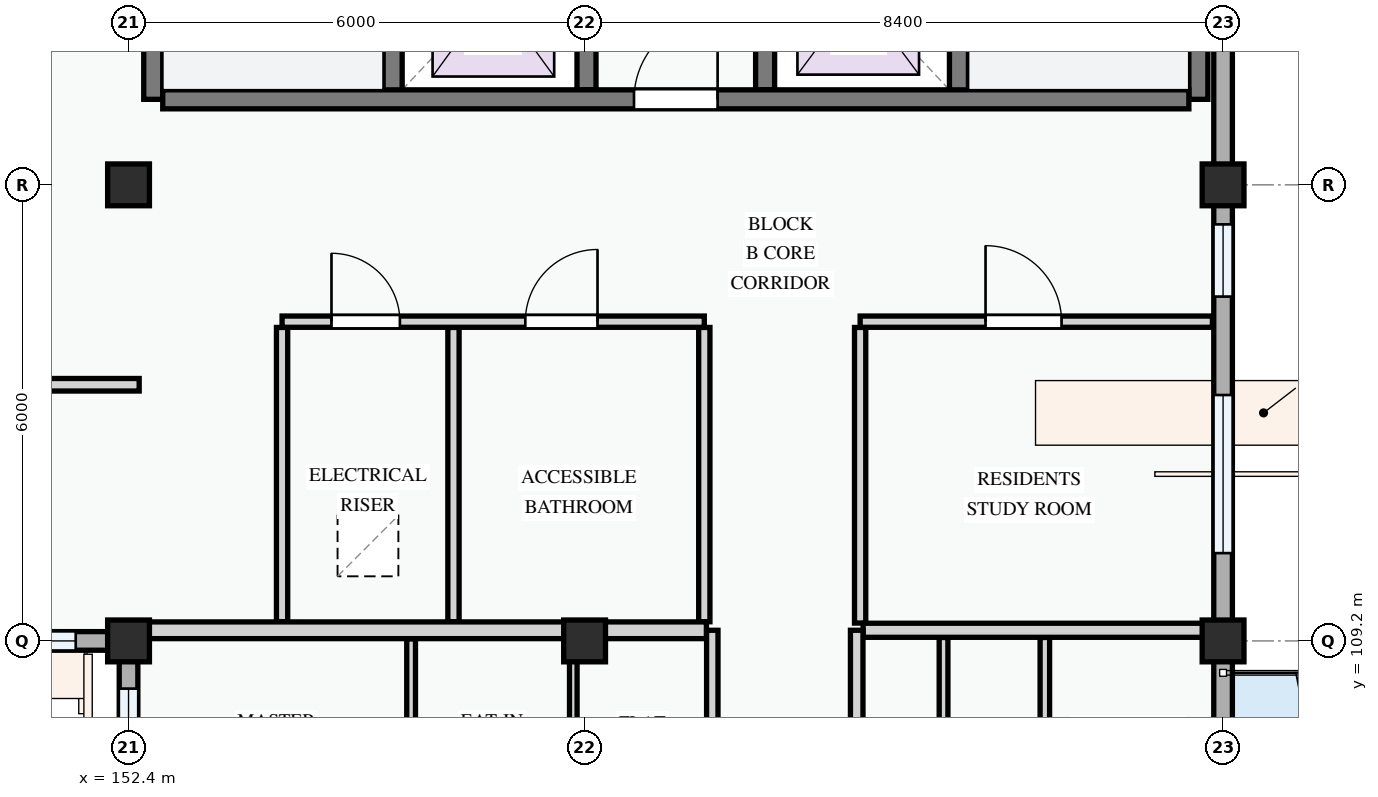
"""IFC4 building model, lengths in metres.
Left out: names, types, materials, properties, quantities, classifications, styles, units other than length and angle.
Written with IfcOpenShell. Run it as: python <this file> out.ifc"""

import sys

from ifc_helpers import new_model, si_unit, direction, frame, frame_2d, origin, origin_2d, place, context, subcontext, project, spatial, rectangle, extrude, element, fill, save


model = new_model("IFC4")
c1 = context("Model", 3, precision=1e-05, world=origin(), true_north=direction((0.0, 1.0)))
c2 = subcontext(c1, "Body", "Model", "MODEL_VIEW")
j1 = project(units=[si_unit("LENGTHUNIT", "METRE"), si_unit("PLANEANGLEUNIT", "RADIAN")], contexts=[c1])
p1 = place(None, origin())
s1 = spatial("IfcSite", under=j1, at=p1, CompositionType="ELEMENT")
p2 = place(p1, origin())
s2 = spatial("IfcBuilding", under=s1, at=p2, CompositionType="ELEMENT")
p3 = place(p2, frame((0.0, 0.0, 37.8)))
s3 = spatial("IfcBuildingStorey", under=s2, at=p3, CompositionType="ELEMENT", Elevation=37.8)
for number, where, z_axis, x_axis in (
    (1, (152.4, 109.2, 0.0), (0.0, 0.0, 1.0), (1.0, 0.0, 0.0)),
    (2, (152.4, 115.2, 0.0), (0.0, 0.0, 1.0), (1.0, 0.0, 0.0)),
    (3, (158.4, 109.2, 0.0), (0.0, 0.0, 1.0), (1.0, 0.0, 0.0)),
    (4, (166.8, 109.2, 0.0), (0.0, 0.0, 1.0), (1.0, 0.0, 0.0)),
    (5, (166.8, 115.2, 0.0), (0.0, 0.0, 1.0), (1.0, 0.0, 0.0)),
):
    element("IfcColumn", number, at=place(p3, frame(where, z_axis=z_axis, x_axis=x_axis)), inside=s3, PredefinedType="COLUMN", context=c2, shape_type="SweptSolid", body=[
        extrude(rectangle(XDim=0.55, YDim=0.55, at=origin_2d()), origin(), (0.0, 0.0, 1.0), 3.3),
    ])
p4 = place(p3, frame((166.8, 109.2, 0.0), z_axis=(0.0, 0.0, 1.0), x_axis=(0.0, 1.0, 0.0)))
e6 = element("IfcWall", 6, at=p4, inside=s3, PredefinedType="STANDARD", context=c2, shape_type="SweptSolid", body=[
    extrude(rectangle(XDim=6.0, YDim=0.245, at=frame_2d((3.0, 0.0))), origin(), (0.0, 0.0, 1.0), 2.575),
])
p5 = place(p4, frame((1.155, 0.0, 0.78)))
e7 = element("IfcOpeningElement", 7, at=p5, cuts=e6, PredefinedType="OPENING", context=c2, shape_type="SweptSolid", body=[
    extrude(rectangle(XDim=2.08, YDim=1.52, at=frame_2d((1.04, 0.76))), frame((0.0, 0.133, 0.0), z_axis=(0.0, -1.0, 0.0), x_axis=(1.0, 0.0, 0.0)), (0.0, 0.0, 1.0), 0.265),
])
p6 = place(p4, frame((4.53, 0.0, 0.78)))
e8 = element("IfcOpeningElement", 8, at=p6, cuts=e6, PredefinedType="OPENING", context=c2, shape_type="SweptSolid", body=[
    extrude(rectangle(XDim=0.95, YDim=1.15, at=frame_2d((0.475, 0.575))), frame((0.0, 0.133, 0.0), z_axis=(0.0, -1.0, 0.0), x_axis=(1.0, 0.0, 0.0)), (0.0, 0.0, 1.0), 0.265),
])
p7 = place(p3, frame((166.8, 115.2, 0.0), z_axis=(0.0, 0.0, 1.0), x_axis=(0.0, 1.0, 0.0)))
e9 = element("IfcWall", 9, at=p7, inside=s3, PredefinedType="STANDARD", context=c2, shape_type="SweptSolid", body=[
    extrude(rectangle(XDim=8.4, YDim=0.245, at=frame_2d((4.2, 0.0))), origin(), (0.0, 0.0, 1.0), 2.425),
])
p8 = place(p7, frame((2.281, 0.0, 0.78)))
e10 = element("IfcOpeningElement", 10, at=p8, cuts=e9, PredefinedType="OPENING", context=c2, shape_type="SweptSolid", body=[
    extrude(rectangle(XDim=1.3, YDim=1.4, at=frame_2d((0.65, 0.7))), frame((0.0, 0.133, 0.0), z_axis=(0.0, -1.0, 0.0), x_axis=(1.0, 0.0, 0.0)), (0.0, 0.0, 1.0), 0.265),
])
p9 = place(p7, frame((5.404, 0.0, 0.78)))
e11 = element("IfcOpeningElement", 11, at=p9, cuts=e9, PredefinedType="OPENING", context=c2, shape_type="SweptSolid", body=[
    extrude(rectangle(XDim=2.0, YDim=1.5, at=frame_2d((1.0, 0.75))), frame((0.0, 0.133, 0.0), z_axis=(0.0, -1.0, 0.0), x_axis=(1.0, 0.0, 0.0)), (0.0, 0.0, 1.0), 0.265),
])
p10 = place(p3, frame((144.0, 109.2, 0.0), z_axis=(0.0, 0.0, 1.0), x_axis=(1.0, 0.0, 0.0)))
e12 = element("IfcWall", 12, at=p10, inside=s3, PredefinedType="STANDARD", context=c2, shape_type="SweptSolid", body=[
    extrude(rectangle(XDim=8.4, YDim=0.245, at=frame_2d((4.2, 0.0))), origin(), (0.0, 0.0, 1.0), 2.375),
])
p11 = place(p10, frame((1.14, 0.0, 0.78)))
e13 = element("IfcOpeningElement", 13, at=p11, cuts=e12, PredefinedType="OPENING", context=c2, shape_type="SweptSolid", body=[
    extrude(rectangle(XDim=1.1, YDim=1.3, at=frame_2d((0.55, 0.65))), frame((0.0, 0.133, 0.0), z_axis=(0.0, -1.0, 0.0), x_axis=(1.0, 0.0, 0.0)), (0.0, 0.0, 1.0), 0.265),
])
p12 = place(p10, frame((4.025, 0.0, 0.78)))
e14 = element("IfcOpeningElement", 14, at=p12, cuts=e12, PredefinedType="OPENING", context=c2, shape_type="SweptSolid", body=[
    extrude(rectangle(XDim=1.05, YDim=1.2, at=frame_2d((0.525, 0.6))), frame((0.0, 0.133, 0.0), z_axis=(0.0, -1.0, 0.0), x_axis=(1.0, 0.0, 0.0)), (0.0, 0.0, 1.0), 0.265),
])
p13 = place(p10, frame((6.555, 0.0, 0.78)))
e15 = element("IfcOpeningElement", 15, at=p13, cuts=e12, PredefinedType="OPENING", context=c2, shape_type="SweptSolid", body=[
    extrude(rectangle(XDim=1.15, YDim=1.25, at=frame_2d((0.575, 0.625))), frame((0.0, 0.133, 0.0), z_axis=(0.0, -1.0, 0.0), x_axis=(1.0, 0.0, 0.0)), (0.0, 0.0, 1.0), 0.265),
])
p14 = place(p3, frame((152.4, 109.2, 0.0), z_axis=(0.0, 0.0, 1.0), x_axis=(0.0, -1.0, 0.0)))
e16 = element("IfcWall", 16, at=p14, inside=s3, PredefinedType="STANDARD", context=c2, shape_type="SweptSolid", body=[
    extrude(rectangle(XDim=8.4, YDim=0.245, at=frame_2d((4.2, 0.0))), origin(), (0.0, 0.0, 1.0), 2.425),
])
p15 = place(p14, frame((0.627, 0.0, 0.78)))
e17 = element("IfcOpeningElement", 17, at=p15, cuts=e16, PredefinedType="OPENING", context=c2, shape_type="SweptSolid", body=[
    extrude(rectangle(XDim=2.2, YDim=1.5, at=frame_2d((1.1, 0.75))), frame((0.0, 0.133, 0.0), z_axis=(0.0, -1.0, 0.0), x_axis=(1.0, 0.0, 0.0)), (0.0, 0.0, 1.0), 0.265),
])
p16 = place(p14, frame((4.107, 0.0, 0.78)))
e18 = element("IfcOpeningElement", 18, at=p16, cuts=e16, PredefinedType="OPENING", context=c2, shape_type="SweptSolid", body=[
    extrude(rectangle(XDim=1.72, YDim=1.52, at=frame_2d((0.86, 0.76))), frame((0.0, 0.133, 0.0), z_axis=(0.0, -1.0, 0.0), x_axis=(1.0, 0.0, 0.0)), (0.0, 0.0, 1.0), 0.265),
])
p17 = place(p14, frame((6.965, 0.0, 0.78)))
e19 = element("IfcOpeningElement", 19, at=p17, cuts=e16, PredefinedType="OPENING", context=c2, shape_type="SweptSolid", body=[
    extrude(rectangle(XDim=0.95, YDim=1.15, at=frame_2d((0.475, 0.575))), frame((0.0, 0.133, 0.0), z_axis=(0.0, -1.0, 0.0), x_axis=(1.0, 0.0, 0.0)), (0.0, 0.0, 1.0), 0.265),
])
p18 = place(p3, frame((166.8, 100.8, 0.0), z_axis=(0.0, 0.0, 1.0), x_axis=(0.0, 1.0, 0.0)))
e20 = element("IfcWall", 20, at=p18, inside=s3, PredefinedType="STANDARD", context=c2, shape_type="SweptSolid", body=[
    extrude(rectangle(XDim=8.4, YDim=0.245, at=frame_2d((4.2, 0.0))), origin(), (0.0, 0.0, 1.0), 2.425),
])
p19 = place(p18, frame((2.615, 0.0, 0.0)))
e21 = element("IfcOpeningElement", 21, at=p19, cuts=e20, PredefinedType="OPENING", context=c2, shape_type="SweptSolid", body=[
    extrude(rectangle(XDim=1.5, YDim=2.2, at=frame_2d((0.75, 1.1))), frame((0.0, 0.133, 0.0), z_axis=(0.0, -1.0, 0.0), x_axis=(1.0, 0.0, 0.0)), (0.0, 0.0, 1.0), 0.265),
])
p20 = place(p18, frame((0.485, 0.0, 0.78)))
e22 = element("IfcOpeningElement", 22, at=p20, cuts=e20, PredefinedType="OPENING", context=c2, shape_type="SweptSolid", body=[
    extrude(rectangle(XDim=0.95, YDim=1.15, at=frame_2d((0.475, 0.575))), frame((0.0, 0.133, 0.0), z_axis=(0.0, -1.0, 0.0), x_axis=(1.0, 0.0, 0.0)), (0.0, 0.0, 1.0), 0.265),
])
p21 = place(p18, frame((5.954, 0.0, 0.78)))
e23 = element("IfcOpeningElement", 23, at=p21, cuts=e20, PredefinedType="OPENING", context=c2, shape_type="SweptSolid", body=[
    extrude(rectangle(XDim=1.3, YDim=1.4, at=frame_2d((0.65, 0.7))), frame((0.0, 0.133, 0.0), z_axis=(0.0, -1.0, 0.0), x_axis=(1.0, 0.0, 0.0)), (0.0, 0.0, 1.0), 0.265),
])
p22 = place(p3, frame((155.875, 123.25, 0.0), z_axis=(0.0, 0.0, 1.0), x_axis=(0.0, -1.0, 0.0)))
e24 = element("IfcWall", 24, at=p22, inside=s3, PredefinedType="SHEAR", context=c2, shape_type="SweptSolid", body=[
    extrude(rectangle(XDim=6.925, YDim=0.25, at=frame_2d((3.462, 0.0))), origin(), (0.0, 0.0, 1.0), 3.0),
])
p23 = place(p22, frame((0.35, 0.0, 0.0)))
e25 = element("IfcOpeningElement", 25, at=p23, cuts=e24, PredefinedType="OPENING", context=c2, shape_type="SweptSolid", body=[
    extrude(rectangle(XDim=0.95, YDim=2.1, at=frame_2d((0.475, 1.05))), frame((0.0, 0.135, 0.0), z_axis=(0.0, -1.0, 0.0), x_axis=(1.0, 0.0, 0.0)), (0.0, 0.0, 1.0), 0.27),
])
p24 = place(p3, frame((152.725, 123.4, 0.0), z_axis=(0.0, 0.0, 1.0), x_axis=(0.0, -1.0, 0.0)))
e26 = element("IfcWall", 26, at=p24, inside=s3, PredefinedType="SHEAR", context=c2, shape_type="SweptSolid", body=[
    extrude(rectangle(XDim=7.075, YDim=0.25, at=frame_2d((3.538, 0.0))), origin(), (0.0, 0.0, 1.0), 3.0),
])
p25 = place(p3, frame((166.475, 123.25, 0.0), z_axis=(0.0, 0.0, 1.0), x_axis=(0.0, -1.0, 0.0)))
e27 = element("IfcWall", 27, at=p25, inside=s3, PredefinedType="SHEAR", context=c2, shape_type="SweptSolid", body=[
    extrude(rectangle(XDim=6.925, YDim=0.25, at=frame_2d((3.462, 0.0))), origin(), (0.0, 0.0, 1.0), 3.0),
])
p26 = place(p3, frame((163.325, 123.25, 0.0), z_axis=(0.0, 0.0, 1.0), x_axis=(0.0, -1.0, 0.0)))
e28 = element("IfcWall", 28, at=p26, inside=s3, PredefinedType="SHEAR", context=c2, shape_type="SweptSolid", body=[
    extrude(rectangle(XDim=6.925, YDim=0.25, at=frame_2d((3.462, 0.0))), origin(), (0.0, 0.0, 1.0), 3.0),
])
p27 = place(p26, frame((0.35, 0.0, 0.0)))
e29 = element("IfcOpeningElement", 29, at=p27, cuts=e28, PredefinedType="OPENING", context=c2, shape_type="SweptSolid", body=[
    extrude(rectangle(XDim=0.95, YDim=2.1, at=frame_2d((0.475, 1.05))), frame((0.0, 0.135, 0.0), z_axis=(0.0, -1.0, 0.0), x_axis=(1.0, 0.0, 0.0)), (0.0, 0.0, 1.0), 0.27),
])
for number, where, z_axis, x_axis in (
    (30, (158.425, 118.875, 0.0), (0.0, 0.0, 1.0), (0.0, -1.0, 0.0)),
    (31, (160.775, 118.875, 0.0), (0.0, 0.0, 1.0), (0.0, -1.0, 0.0)),
):
    element("IfcWall", number, at=place(p3, frame(where, z_axis=z_axis, x_axis=x_axis)), inside=s3, PredefinedType="SHEAR", context=c2, shape_type="SweptSolid", body=[
        extrude(rectangle(XDim=2.425, YDim=0.25, at=frame_2d((1.212, 0.0))), origin(), (0.0, 0.0, 1.0), 3.0),
    ])
p28 = place(p3, frame((152.85, 116.325, 0.0), z_axis=(0.0, 0.0, 1.0), x_axis=(1.0, 0.0, 0.0)))
e32 = element("IfcWall", 32, at=p28, inside=s3, PredefinedType="SHEAR", context=c2, shape_type="SweptSolid", body=[
    extrude(rectangle(XDim=13.5, YDim=0.25, at=frame_2d((6.75, 0.0))), origin(), (0.0, 0.0, 1.0), 3.0),
])
p29 = place(p28, frame((6.2, 0.0, 0.0)))
e33 = element("IfcOpeningElement", 33, at=p29, cuts=e32, PredefinedType="OPENING", context=c2, shape_type="SweptSolid", body=[
    extrude(rectangle(XDim=1.1, YDim=2.15, at=frame_2d((0.55, 1.075))), frame((0.0, 0.135, 0.0), z_axis=(0.0, -1.0, 0.0), x_axis=(1.0, 0.0, 0.0)), (0.0, 0.0, 1.0), 0.27),
])
for number, where, z_axis, x_axis in (
    (34, (154.42, 113.324, 0.0), (0.0, 0.0, 1.0), (0.0, -1.0, 0.0)),
    (35, (156.675, 113.324, 0.0), (0.0, 0.0, 1.0), (0.0, -1.0, 0.0)),
    (36, (159.975, 113.324, 0.0), (0.0, 0.0, 1.0), (0.0, -1.0, 0.0)),
):
    element("IfcWall", number, at=place(p3, frame(where, z_axis=z_axis, x_axis=x_axis)), inside=s3, PredefinedType="PARTITIONING", context=c2, shape_type="SweptSolid", body=[
        extrude(rectangle(XDim=3.872, YDim=0.148, at=frame_2d((1.936, 0.0))), origin(), (0.0, 0.0, 1.0), 3.0),
    ])
p30 = place(p3, frame((162.025, 113.324, 0.0), z_axis=(0.0, 0.0, 1.0), x_axis=(0.0, -1.0, 0.0)))
e37 = element("IfcWall", 37, at=p30, inside=s3, PredefinedType="PARTITIONING", context=c2, shape_type="SweptSolid", body=[
    extrude(rectangle(XDim=3.889, YDim=0.148, at=frame_2d((1.945, 0.0))), origin(), (0.0, 0.0, 1.0), 3.0),
])
p31 = place(p3, frame((154.42, 113.4, 0.0), z_axis=(0.0, 0.0, 1.0), x_axis=(1.0, 0.0, 0.0)))
e38 = element("IfcWall", 38, at=p31, inside=s3, PredefinedType="PARTITIONING", context=c2, shape_type="SweptSolid", body=[
    extrude(rectangle(XDim=5.555, YDim=0.148, at=frame_2d((2.778, 0.0))), origin(), (0.0, 0.0, 1.0), 3.0),
])
p32 = place(p31, frame((0.65, 0.0, 0.0)))
e39 = element("IfcOpeningElement", 39, at=p32, cuts=e38, PredefinedType="OPENING", context=c2, shape_type="SweptSolid", body=[
    extrude(rectangle(XDim=0.9, YDim=2.1, at=frame_2d((0.45, 1.05))), frame((0.0, 0.084, 0.0), z_axis=(0.0, -1.0, 0.0), x_axis=(1.0, 0.0, 0.0)), (0.0, 0.0, 1.0), 0.168),
])
p33 = place(p31, frame((3.2, 0.0, 0.0)))
e40 = element("IfcOpeningElement", 40, at=p33, cuts=e38, PredefinedType="OPENING", context=c2, shape_type="SweptSolid", body=[
    extrude(rectangle(XDim=0.95, YDim=2.1, at=frame_2d((0.475, 1.05))), frame((0.0, 0.084, 0.0), z_axis=(0.0, -1.0, 0.0), x_axis=(1.0, 0.0, 0.0)), (0.0, 0.0, 1.0), 0.168),
])
p34 = place(p3, frame((162.025, 113.4, 0.0), z_axis=(0.0, 0.0, 1.0), x_axis=(1.0, 0.0, 0.0)))
e41 = element("IfcWall", 41, at=p34, inside=s3, PredefinedType="PARTITIONING", context=c2, shape_type="SweptSolid", body=[
    extrude(rectangle(XDim=4.635, YDim=0.148, at=frame_2d((2.317, 0.0))), origin(), (0.0, 0.0, 1.0), 3.0),
])
p35 = place(p34, frame((1.65, 0.0, 0.0)))
e42 = element("IfcOpeningElement", 42, at=p35, cuts=e41, PredefinedType="OPENING", context=c2, shape_type="SweptSolid", body=[
    extrude(rectangle(XDim=1.0, YDim=2.15, at=frame_2d((0.5, 1.075))), frame((0.0, 0.084, 0.0), z_axis=(0.0, -1.0, 0.0), x_axis=(1.0, 0.0, 0.0)), (0.0, 0.0, 1.0), 0.168),
])
p36 = place(p3, frame((150.127, 112.57, 0.0), z_axis=(0.0, 0.0, 1.0), x_axis=(1.0, 0.0, 0.0)))
e43 = element("IfcWall", 43, at=p36, inside=s3, PredefinedType="PARTITIONING", context=c2, shape_type="SweptSolid", body=[
    extrude(rectangle(XDim=2.413, YDim=0.165, at=frame_2d((1.207, 0.0))), origin(), (0.0, 0.0, 1.0), 3.0),
])
p37 = place(p3, frame((156.118, 106.0, 0.0), z_axis=(0.0, 0.0, 1.0), x_axis=(0.0, 1.0, 0.0)))
e44 = element("IfcWall", 44, at=p37, inside=s3, PredefinedType="PARTITIONING", context=c2, shape_type="SweptSolid", body=[
    extrude(rectangle(XDim=3.229, YDim=0.115, at=frame_2d((1.614, 0.0))), origin(), (0.0, 0.0, 1.0), 3.0),
])
p38 = place(p3, frame((158.251, 106.0, 0.0), z_axis=(0.0, 0.0, 1.0), x_axis=(0.0, 1.0, 0.0)))
e45 = element("IfcWall", 45, at=p38, inside=s3, PredefinedType="PARTITIONING", context=c2, shape_type="SweptSolid", body=[
    extrude(rectangle(XDim=3.229, YDim=0.1, at=frame_2d((1.614, 0.0))), origin(), (0.0, 0.0, 1.0), 2.425),
])
p39 = place(p3, frame((164.455, 105.871, 0.0), z_axis=(0.0, 0.0, 1.0), x_axis=(0.0, 1.0, 0.0)))
e46 = element("IfcWall", 46, at=p39, inside=s3, PredefinedType="PARTITIONING", context=c2, shape_type="SweptSolid", body=[
    extrude(rectangle(XDim=3.375, YDim=0.125, at=frame_2d((1.688, 0.0))), origin(), (0.0, 0.0, 1.0), 3.0),
])
p40 = place(p3, frame((163.122, 105.871, 0.0), z_axis=(0.0, 0.0, 1.0), x_axis=(0.0, 1.0, 0.0)))
e47 = element("IfcWall", 47, at=p40, inside=s3, PredefinedType="PARTITIONING", context=c2, shape_type="SweptSolid", body=[
    extrude(rectangle(XDim=3.375, YDim=0.115, at=frame_2d((1.688, 0.0))), origin(), (0.0, 0.0, 1.0), 3.0),
])
p41 = place(p3, frame((152.46, 109.34, 0.0), z_axis=(0.0, 0.0, 1.0), x_axis=(1.0, 0.0, 0.0)))
e48 = element("IfcWall", 48, at=p41, inside=s3, PredefinedType="PARTITIONING", context=c2, shape_type="SweptSolid", body=[
    extrude(rectangle(XDim=7.543, YDim=0.22, at=frame_2d((3.771, 0.0))), origin(), (0.0, 0.0, 1.0), 2.375),
])
p42 = place(p3, frame((162.064, 109.34, 0.0), z_axis=(0.0, 0.0, 1.0), x_axis=(1.0, 0.0, 0.0)))
e49 = element("IfcWall", 49, at=p42, inside=s3, PredefinedType="PARTITIONING", context=c2, shape_type="SweptSolid", body=[
    extrude(rectangle(XDim=4.611, YDim=0.185, at=frame_2d((2.306, 0.0))), origin(), (0.0, 0.0, 1.0), 2.375),
])
p43 = place(p3, frame((160.08, 86.46, 0.0), z_axis=(0.0, 0.0, 1.0), x_axis=(0.0, 1.0, 0.0)))
e50 = element("IfcWall", 50, at=p43, inside=s3, PredefinedType="PARTITIONING", context=c2, shape_type="SweptSolid", body=[
    extrude(rectangle(XDim=22.88, YDim=0.15, at=frame_2d((11.44, 0.0))), origin(), (0.0, 0.0, 1.0), 3.0),
])
p44 = place(p43, frame((2.1, 0.0, 0.0)))
e51 = element("IfcOpeningElement", 51, at=p44, cuts=e50, PredefinedType="OPENING", context=c2, shape_type="SweptSolid", body=[
    extrude(rectangle(XDim=0.96, YDim=2.12, at=frame_2d((0.48, 1.06))), frame((0.0, 0.085, 0.0), z_axis=(0.0, -1.0, 0.0), x_axis=(1.0, 0.0, 0.0)), (0.0, 0.0, 1.0), 0.17),
])
p45 = place(p43, frame((10.135, 0.0, 0.0)))
e52 = element("IfcOpeningElement", 52, at=p45, cuts=e50, PredefinedType="OPENING", context=c2, shape_type="SweptSolid", body=[
    extrude(rectangle(XDim=0.92, YDim=2.1, at=frame_2d((0.46, 1.05))), frame((0.0, 0.085, 0.0), z_axis=(0.0, -1.0, 0.0), x_axis=(1.0, 0.0, 0.0)), (0.0, 0.0, 1.0), 0.17),
])
p46 = place(p43, frame((18.083, 0.0, 0.0)))
e53 = element("IfcOpeningElement", 53, at=p46, cuts=e50, PredefinedType="OPENING", context=c2, shape_type="SweptSolid", body=[
    extrude(rectangle(XDim=0.92, YDim=2.1, at=frame_2d((0.46, 1.05))), frame((0.0, 0.085, 0.0), z_axis=(0.0, -1.0, 0.0), x_axis=(1.0, 0.0, 0.0)), (0.0, 0.0, 1.0), 0.17),
])
p47 = place(p3, frame((161.98, 86.46, 0.0), z_axis=(0.0, 0.0, 1.0), x_axis=(0.0, 1.0, 0.0)))
e54 = element("IfcWall", 54, at=p47, inside=s3, PredefinedType="PARTITIONING", context=c2, shape_type="SweptSolid", body=[
    extrude(rectangle(XDim=22.88, YDim=0.165, at=frame_2d((11.44, 0.0))), origin(), (0.0, 0.0, 1.0), 3.0),
])
p48 = place(p47, frame((1.968, 0.0, 0.0)))
e55 = element("IfcOpeningElement", 55, at=p48, cuts=e54, PredefinedType="OPENING", context=c2, shape_type="SweptSolid", body=[
    extrude(rectangle(XDim=0.92, YDim=2.1, at=frame_2d((0.46, 1.05))), frame((0.0, 0.093, 0.0), z_axis=(0.0, -1.0, 0.0), x_axis=(1.0, 0.0, 0.0)), (0.0, 0.0, 1.0), 0.185),
])
p49 = place(p47, frame((9.946, 0.0, 0.0)))
e56 = element("IfcOpeningElement", 56, at=p49, cuts=e54, PredefinedType="OPENING", context=c2, shape_type="SweptSolid", body=[
    extrude(rectangle(XDim=0.92, YDim=2.1, at=frame_2d((0.46, 1.05))), frame((0.0, 0.093, 0.0), z_axis=(0.0, -1.0, 0.0), x_axis=(1.0, 0.0, 0.0)), (0.0, 0.0, 1.0), 0.185),
])
p50 = place(p47, frame((18.072, 0.0, 0.0)))
e57 = element("IfcOpeningElement", 57, at=p50, cuts=e54, PredefinedType="OPENING", context=c2, shape_type="SweptSolid", body=[
    extrude(rectangle(XDim=0.96, YDim=2.12, at=frame_2d((0.48, 1.06))), frame((0.0, 0.093, 0.0), z_axis=(0.0, -1.0, 0.0), x_axis=(1.0, 0.0, 0.0)), (0.0, 0.0, 1.0), 0.185),
])
p51 = place(p5, origin())
e58 = element("IfcWindow", 58, at=p51, inside=s3, PartitioningType="DOUBLE_PANEL_VERTICAL", PredefinedType="WINDOW", context=c2, shape_type="SweptSolid", body=[
    extrude(rectangle(XDim=2.08, YDim=1.52, at=frame_2d((1.04, 0.76))), frame((0.0, 0.03, 0.0), z_axis=(0.0, -1.0, 0.0), x_axis=(1.0, 0.0, 0.0)), (0.0, 0.0, 1.0), 0.06),
])
fill(e7, e58)
p52 = place(p6, origin())
e59 = element("IfcWindow", 59, at=p52, inside=s3, PartitioningType="SINGLE_PANEL", PredefinedType="WINDOW", context=c2, shape_type="SweptSolid", body=[
    extrude(rectangle(XDim=0.95, YDim=1.15, at=frame_2d((0.475, 0.575))), frame((0.0, 0.03, 0.0), z_axis=(0.0, -1.0, 0.0), x_axis=(1.0, 0.0, 0.0)), (0.0, 0.0, 1.0), 0.06),
])
fill(e8, e59)
p53 = place(p13, origin())
e60 = element("IfcWindow", 60, at=p53, inside=s3, PartitioningType="SINGLE_PANEL", PredefinedType="WINDOW", context=c2, shape_type="SweptSolid", body=[
    extrude(rectangle(XDim=1.15, YDim=1.25, at=frame_2d((0.575, 0.625))), frame((0.0, 0.03, 0.0), z_axis=(0.0, -1.0, 0.0), x_axis=(1.0, 0.0, 0.0)), (0.0, 0.0, 1.0), 0.06),
])
fill(e15, e60)
p54 = place(p15, origin())
e61 = element("IfcWindow", 61, at=p54, inside=s3, PartitioningType="DOUBLE_PANEL_VERTICAL", PredefinedType="WINDOW", context=c2, shape_type="SweptSolid", body=[
    extrude(rectangle(XDim=2.2, YDim=1.5, at=frame_2d((1.1, 0.75))), frame((0.0, 0.03, 0.0), z_axis=(0.0, -1.0, 0.0), x_axis=(1.0, 0.0, 0.0)), (0.0, 0.0, 1.0), 0.06),
])
fill(e17, e61)
p55 = place(p29, origin())
e62 = element("IfcDoor", 62, at=p55, inside=s3, OperationType="SINGLE_SWING_RIGHT", PredefinedType="DOOR", context=c2, shape_type="SweptSolid", body=[
    extrude(rectangle(XDim=1.1, YDim=2.15, at=frame_2d((0.55, 1.075))), frame((0.0, 0.025, 0.0), z_axis=(0.0, -1.0, 0.0), x_axis=(1.0, 0.0, 0.0)), (0.0, 0.0, 1.0), 0.05),
])
fill(e33, e62)
p56 = place(p32, origin())
e63 = element("IfcDoor", 63, at=p56, inside=s3, OperationType="SINGLE_SWING_LEFT", PredefinedType="DOOR", context=c2, shape_type="SweptSolid", body=[
    extrude(rectangle(XDim=0.9, YDim=2.1, at=frame_2d((0.45, 1.05))), frame((0.0, 0.025, 0.0), z_axis=(0.0, -1.0, 0.0), x_axis=(1.0, 0.0, 0.0)), (0.0, 0.0, 1.0), 0.05),
])
fill(e39, e63)
p57 = place(p33, origin())
e64 = element("IfcDoor", 64, at=p57, inside=s3, OperationType="SINGLE_SWING_RIGHT", PredefinedType="DOOR", context=c2, shape_type="SweptSolid", body=[
    extrude(rectangle(XDim=0.95, YDim=2.1, at=frame_2d((0.475, 1.05))), frame((0.0, 0.025, 0.0), z_axis=(0.0, -1.0, 0.0), x_axis=(1.0, 0.0, 0.0)), (0.0, 0.0, 1.0), 0.05),
])
fill(e40, e64)
p58 = place(p35, origin())
e65 = element("IfcDoor", 65, at=p58, inside=s3, OperationType="SINGLE_SWING_LEFT", PredefinedType="DOOR", context=c2, shape_type="SweptSolid", body=[
    extrude(rectangle(XDim=1.0, YDim=2.15, at=frame_2d((0.5, 1.075))), frame((0.0, 0.025, 0.0), z_axis=(0.0, -1.0, 0.0), x_axis=(1.0, 0.0, 0.0)), (0.0, 0.0, 1.0), 0.05),
])
fill(e42, e65)
save(model, sys.argv[1])
